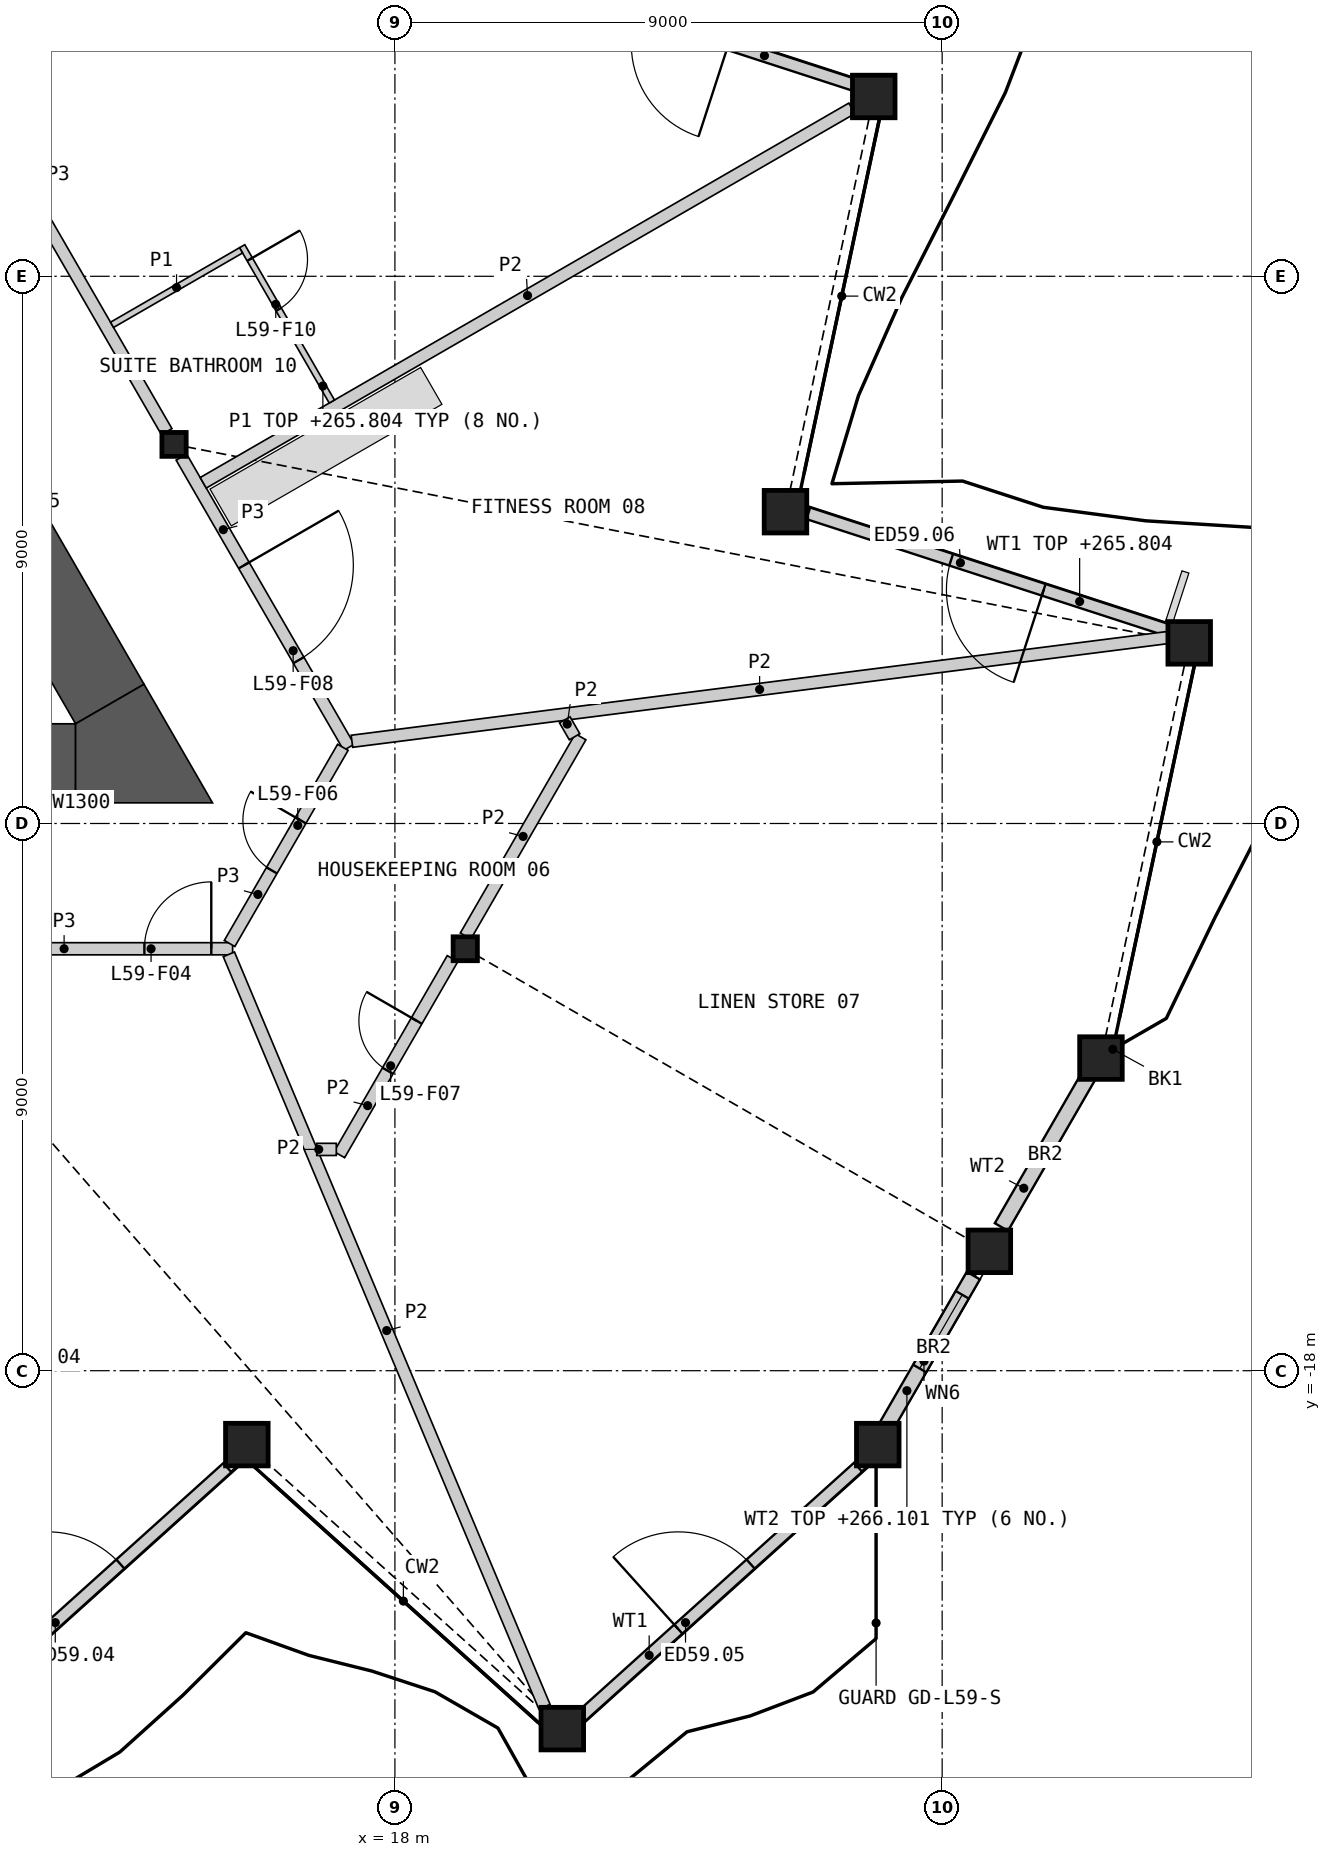
"""IFC4 building model, lengths in metres.
Left out: names, types, materials, properties, quantities, classifications, styles, units other than length and angle.
Written with IfcOpenShell. Run it as: python <this file> out.ifc"""

import sys

from ifc_helpers import new_model, si_unit, direction, frame, frame_2d, origin, origin_2d, place, context, subcontext, project, spatial, polyline, rectangle, hollow_rectangle, i_section, outline, extrude, element, fill, save


model = new_model("IFC4")
c1 = context("Model", 3, precision=1e-05, world=origin(), true_north=direction((0.0, 1.0)))
c2 = subcontext(c1, "Body", "Model", "MODEL_VIEW")
j1 = project(units=[si_unit("LENGTHUNIT", "METRE"), si_unit("PLANEANGLEUNIT", "RADIAN")], contexts=[c1])
p1 = place(None, origin())
s1 = spatial("IfcSite", under=j1, at=p1, CompositionType="ELEMENT")
p2 = place(p1, origin())
s2 = spatial("IfcBuilding", under=s1, at=p2, CompositionType="ELEMENT")
p3 = place(p2, frame((0.0, 0.0, 263.4)))
s3 = spatial("IfcBuildingStorey", under=s2, at=p3, CompositionType="ELEMENT", Elevation=263.4)
for number, where, z_axis, x_axis in (
    (1, (15.565, -19.215, 0.0), (0.0, 0.0, 1.0), (1.0, 0.0, 0.0)),
    (2, (20.753, -23.887, 0.0), (0.0, 0.0, 1.0), (1.0, 0.0, 0.0)),
    (3, (25.941, -19.215, 0.0), (0.0, 0.0, 1.0), (1.0, 0.0, 0.0)),
    (4, (27.776, -16.037, 0.0), (0.0, 0.0, 1.0), (1.0, 0.0, 0.0)),
    (5, (29.612, -12.858, 0.0), (0.0, 0.0, 1.0), (1.0, 0.0, 0.0)),
    (6, (31.063, -6.029, 0.0), (0.0, 0.0, 1.0), (1.0, 0.0, 0.0)),
    (7, (24.423, -3.872, 0.0), (0.0, 0.0, 1.0), (1.0, 0.0, 0.0)),
    (8, (25.875, 2.957, 0.0), (0.0, 0.0, 1.0), (1.0, 0.0, 0.0)),
):
    element("IfcColumn", number, at=place(p3, frame(where, z_axis=z_axis, x_axis=x_axis)), inside=s3, PredefinedType="COLUMN", context=c2, shape_type="SweptSolid", body=[
        extrude(hollow_rectangle(XDim=0.7, YDim=0.7, WallThickness=0.045, at=origin_2d()), origin(), (0.0, 0.0, 1.0), 3.6),
    ])
for number, where, z_axis, x_axis in (
    (9, (19.157, -11.06, 0.0), (0.0, 0.0, 1.0), (1.0, 0.0, 0.0)),
    (10, (14.368, -2.765, 0.0), (0.0, 0.0, 1.0), (1.0, 0.0, 0.0)),
):
    element("IfcColumn", number, at=place(p3, frame(where, z_axis=z_axis, x_axis=x_axis)), inside=s3, PredefinedType="COLUMN", context=c2, shape_type="SweptSolid", body=[
        extrude(i_section(OverallWidth=0.399, OverallDepth=0.393, WebThickness=0.023, FlangeThickness=0.037, at=origin_2d()), origin(), (0.0, 0.0, 1.0), 3.6),
    ])
p4 = place(p3, frame((10.671, -23.713, 0.0), z_axis=(0.0, 0.0, 1.0), x_axis=(0.74316789204, 0.669104987458, 0.0)))
e11 = element("IfcWall", 11, at=p4, inside=s3, PredefinedType="SOLIDWALL", context=c2, shape_type="SweptSolid", body=[
    extrude(rectangle(XDim=6.154, YDim=0.2, at=frame_2d((3.077, 0.0))), origin(), (0.0, 0.0, 1.0), 2.701),
])
p5 = place(p4, frame((2.186, 0.0, 0.0)))
e12 = element("IfcOpeningElement", 12, at=p5, cuts=e11, PredefinedType="OPENING", context=c2, shape_type="SweptSolid", body=[
    extrude(rectangle(XDim=1.6, YDim=2.4, at=frame_2d((0.8, 1.2))), frame((0.0, 0.11, 0.0), z_axis=(0.0, -1.0, 0.0), x_axis=(1.0, 0.0, 0.0)), (0.0, 0.0, 1.0), 0.22),
])
p6 = place(p3, frame((21.036, -23.713, 0.0), z_axis=(0.0, 0.0, 1.0), x_axis=(0.743142515738, 0.669133171575, 0.0)))
e13 = element("IfcWall", 13, at=p6, inside=s3, PredefinedType="SOLIDWALL", context=c2, shape_type="SweptSolid", body=[
    extrude(rectangle(XDim=6.166, YDim=0.2, at=frame_2d((3.083, 0.0))), origin(), (0.0, 0.0, 1.0), 2.701),
])
p7 = place(p6, frame((2.186, 0.0, 0.0)))
e14 = element("IfcOpeningElement", 14, at=p7, cuts=e13, PredefinedType="OPENING", context=c2, shape_type="SweptSolid", body=[
    extrude(rectangle(XDim=1.6, YDim=2.4, at=frame_2d((0.8, 1.2))), frame((0.0, 0.11, 0.0), z_axis=(0.0, -1.0, 0.0), x_axis=(1.0, 0.0, 0.0)), (0.0, 0.0, 1.0), 0.22),
])
p8 = place(p3, frame((26.056, -18.96, 0.0), z_axis=(0.0, 0.0, 1.0), x_axis=(0.499949632511, 0.866054481515, 0.0)))
e15 = element("IfcWall", 15, at=p8, inside=s3, PredefinedType="SOLIDWALL", context=c2, shape_type="SweptSolid", body=[
    extrude(rectangle(XDim=2.915, YDim=0.25, at=frame_2d((1.458, 0.0))), origin(), (0.0, 0.0, 1.0), 2.701),
])
p9 = place(p8, frame((1.15, 0.0, 1.9)))
e16 = element("IfcOpeningElement", 16, at=p9, cuts=e15, PredefinedType="OPENING", context=c2, shape_type="SweptSolid", body=[
    extrude(rectangle(XDim=1.4, YDim=0.6, at=frame_2d((0.7, 0.3))), frame((0.0, 0.135, 0.0), z_axis=(0.0, -1.0, 0.0), x_axis=(1.0, 0.0, 0.0)), (0.0, 0.0, 1.0), 0.27),
])
p10 = place(p3, frame((27.974, -15.637, 0.0), z_axis=(0.0, 0.0, 1.0), x_axis=(0.499971101808, 0.86604208752, 0.0)))
e17 = element("IfcWall", 17, at=p10, inside=s3, PredefinedType="SOLIDWALL", context=c2, shape_type="SweptSolid", body=[
    extrude(rectangle(XDim=2.947, YDim=0.25, at=frame_2d((1.473, 0.0))), origin(), (0.0, 0.0, 1.0), 2.701),
])
p11 = place(p3, frame((30.749, -5.832, 0.0), z_axis=(0.0, 0.0, 1.0), x_axis=(-0.95105557136, 0.309019902571, 0.0)))
e18 = element("IfcWall", 18, at=p11, inside=s3, PredefinedType="SOLIDWALL", context=c2, shape_type="SweptSolid", body=[
    extrude(rectangle(XDim=6.257, YDim=0.2, at=frame_2d((3.128, 0.0))), origin(), (0.0, 0.0, 1.0), 2.404),
])
p12 = place(p11, frame((2.186, 0.0, 0.0)))
e19 = element("IfcOpeningElement", 19, at=p12, cuts=e18, PredefinedType="OPENING", context=c2, shape_type="SweptSolid", body=[
    extrude(rectangle(XDim=1.6, YDim=2.4, at=frame_2d((0.8, 1.2))), frame((0.0, 0.11, 0.0), z_axis=(0.0, -1.0, 0.0), x_axis=(1.0, 0.0, 0.0)), (0.0, 0.0, 1.0), 0.22),
])
p13 = place(p3, frame((25.566, 3.145, 0.0), z_axis=(0.0, 0.0, 1.0), x_axis=(-0.951057270474, 0.309014673241, 0.0)))
e20 = element("IfcWall", 20, at=p13, inside=s3, PredefinedType="SOLIDWALL", context=c2, shape_type="SweptSolid", body=[
    extrude(rectangle(XDim=6.263, YDim=0.2, at=frame_2d((3.131, 0.0))), origin(), (0.0, 0.0, 1.0), 2.701),
])
p14 = place(p13, frame((2.186, 0.0, 0.0)))
e21 = element("IfcOpeningElement", 21, at=p14, cuts=e20, PredefinedType="OPENING", context=c2, shape_type="SweptSolid", body=[
    extrude(rectangle(XDim=1.6, YDim=2.4, at=frame_2d((0.8, 1.2))), frame((0.0, 0.11, 0.0), z_axis=(0.0, -1.0, 0.0), x_axis=(1.0, 0.0, 0.0)), (0.0, 0.0, 1.0), 0.22),
])
p15 = place(p3, frame((-12.748, -8.01, 0.0), z_axis=(0.0, 0.0, 1.0), x_axis=(1.0, 0.0, 0.0)))
e22 = element("IfcWall", 22, at=p15, inside=s3, PredefinedType="SHEAR", context=c2, shape_type="SweptSolid", body=[
    extrude(rectangle(XDim=25.497, YDim=1.3, at=frame_2d((12.748, 0.0))), origin(), (0.0, 0.0, 1.0), 3.25),
])
p16 = place(p3, frame((13.311, -7.035, 0.0), z_axis=(0.0, 0.0, 1.0), x_axis=(-0.500003555838, 0.866023350811, 0.0)))
e23 = element("IfcWall", 23, at=p16, inside=s3, PredefinedType="SHEAR", context=c2, shape_type="SweptSolid", body=[
    extrude(rectangle(XDim=4.26, YDim=1.3, at=frame_2d((2.13, 0.0))), origin(), (0.0, 0.0, 1.0), 3.25),
])
p17 = place(p3, origin())
e24 = element("IfcWall", 24, at=p17, inside=s3, PredefinedType="SHEAR", context=c2, shape_type="SweptSolid", body=[
    extrude(outline(polyline([(12.748, -8.66), (12.748, -7.36), (13.874, -6.71), (15.0, -8.66), (12.748, -8.66)])), origin(), (0.0, 0.0, 1.0), 3.25),
])
p18 = place(p3, frame((9.699, 5.321, 0.0), z_axis=(0.0, 0.0, 1.0), x_axis=(0.49998193945, -0.866035830797, 0.0)))
e25 = element("IfcWall", 25, at=p18, inside=s3, PredefinedType="PARTITIONING", context=c2, shape_type="SweptSolid", body=[
    extrude(rectangle(XDim=9.094, YDim=0.2, at=frame_2d((4.547, 0.0))), origin(), (0.0, 0.0, 1.0), 3.25),
])
p19 = place(p18, frame((1.162, 0.0, 0.0)))
e26 = element("IfcOpeningElement", 26, at=p19, cuts=e25, PredefinedType="OPENING", context=c2, shape_type="SweptSolid", body=[
    extrude(rectangle(XDim=1.1, YDim=2.1, at=frame_2d((0.55, 1.05))), frame((0.0, 0.11, 0.0), z_axis=(0.0, -1.0, 0.0), x_axis=(1.0, 0.0, 0.0)), (0.0, 0.0, 1.0), 0.22),
])
p20 = place(p3, frame((9.788, -11.06, 0.0), z_axis=(0.0, 0.0, 1.0), x_axis=(1.0, 0.0, 0.0)))
e27 = element("IfcWall", 27, at=p20, inside=s3, PredefinedType="PARTITIONING", context=c2, shape_type="SweptSolid", body=[
    extrude(rectangle(XDim=5.543, YDim=0.2, at=frame_2d((2.771, 0.0))), origin(), (0.0, 0.0, 1.0), 3.25),
])
p21 = place(p20, frame((4.092, 0.0, 0.0)))
e28 = element("IfcOpeningElement", 28, at=p21, cuts=e27, PredefinedType="OPENING", context=c2, shape_type="SweptSolid", body=[
    extrude(rectangle(XDim=1.1, YDim=2.1, at=frame_2d((0.55, 1.05))), frame((0.0, 0.11, 0.0), z_axis=(0.0, -1.0, 0.0), x_axis=(1.0, 0.0, 0.0)), (0.0, 0.0, 1.0), 0.22),
])
p22 = place(p3, frame((14.489, -2.975, 0.0), z_axis=(0.0, 0.0, 1.0), x_axis=(0.500017753321, -0.866015153657, 0.0)))
e29 = element("IfcWall", 29, at=p22, inside=s3, PredefinedType="PARTITIONING", context=c2, shape_type="SweptSolid", body=[
    extrude(rectangle(XDim=5.51, YDim=0.2, at=frame_2d((2.755, 0.0))), origin(), (0.0, 0.0, 1.0), 3.25),
])
p23 = place(p22, frame((2.056, 0.0, 0.0)))
e30 = element("IfcOpeningElement", 30, at=p23, cuts=e29, PredefinedType="OPENING", context=c2, shape_type="SweptSolid", body=[
    extrude(rectangle(XDim=1.8, YDim=2.1, at=frame_2d((0.9, 1.05))), frame((0.0, 0.11, 0.0), z_axis=(0.0, -1.0, 0.0), x_axis=(1.0, 0.0, 0.0)), (0.0, 0.0, 1.0), 0.22),
])
p24 = place(p3, frame((15.281, -10.974, 0.0), z_axis=(0.0, 0.0, 1.0), x_axis=(0.499958791762, 0.866049194065, 0.0)))
e31 = element("IfcWall", 31, at=p24, inside=s3, PredefinedType="PARTITIONING", context=c2, shape_type="SweptSolid", body=[
    extrude(rectangle(XDim=3.726, YDim=0.2, at=frame_2d((1.863, 0.0))), origin(), (0.0, 0.0, 1.0), 3.25),
])
p25 = place(p24, frame((1.388, 0.0, 0.0)))
e32 = element("IfcOpeningElement", 32, at=p25, cuts=e31, PredefinedType="OPENING", context=c2, shape_type="SweptSolid", body=[
    extrude(rectangle(XDim=0.95, YDim=2.1, at=frame_2d((0.475, 1.05))), frame((0.0, 0.11, 0.0), z_axis=(0.0, -1.0, 0.0), x_axis=(1.0, 0.0, 0.0)), (0.0, 0.0, 1.0), 0.22),
])
p26 = place(p3, frame((17.293, -7.648, 0.0), z_axis=(0.0, 0.0, 1.0), x_axis=(0.992013080374, 0.126135040205, 0.0)))
e33 = element("IfcWall", 33, at=p26, inside=s3, PredefinedType="PARTITIONING", context=c2, shape_type="SweptSolid", body=[
    extrude(rectangle(XDim=13.518, YDim=0.2, at=frame_2d((6.759, 0.0))), origin(), (0.0, 0.0, 1.0), 2.404),
])
p27 = place(p3, frame((15.27, -11.153, 0.0), z_axis=(0.0, 0.0, 1.0), x_axis=(0.386788567553, -0.922168424969, 0.0)))
e34 = element("IfcWall", 34, at=p27, inside=s3, PredefinedType="PARTITIONING", context=c2, shape_type="SweptSolid", body=[
    extrude(rectangle(XDim=13.419, YDim=0.2, at=frame_2d((6.709, 0.0))), origin(), (0.0, 0.0, 1.0), 2.404),
])
p28 = place(p3, frame((14.848, -3.396, 0.0), z_axis=(0.0, 0.0, 1.0), x_axis=(0.866026822589, 0.49999754255, 0.0)))
e35 = element("IfcWall", 35, at=p28, inside=s3, PredefinedType="PARTITIONING", context=c2, shape_type="SweptSolid", body=[
    extrude(rectangle(XDim=12.317, YDim=0.2, at=frame_2d((6.159, 0.0))), origin(), (0.0, 0.0, 1.0), 2.404),
])
p29 = place(p3, frame((19.162, -10.851, 0.0), z_axis=(0.0, 0.0, 1.0), x_axis=(0.500011000363, 0.866019052629, 0.0)))
e36 = element("IfcWall", 36, at=p29, inside=s3, PredefinedType="PARTITIONING", context=c2, shape_type="SweptSolid", body=[
    extrude(rectangle(XDim=3.784, YDim=0.2, at=frame_2d((1.892, 0.0))), origin(), (0.0, 0.0, 1.0), 2.404),
])
p30 = place(p3, frame((17.086, -14.447, 0.0), z_axis=(0.0, 0.0, 1.0), x_axis=(0.500004411858, 0.866022856582, 0.0)))
e37 = element("IfcWall", 37, at=p30, inside=s3, PredefinedType="PARTITIONING", context=c2, shape_type="SweptSolid", body=[
    extrude(rectangle(XDim=3.723, YDim=0.2, at=frame_2d((1.861, 0.0))), origin(), (0.0, 0.0, 1.0), 2.404),
])
p31 = place(p30, frame((1.593, 0.0, 0.0)))
e38 = element("IfcOpeningElement", 38, at=p31, cuts=e37, PredefinedType="OPENING", context=c2, shape_type="SweptSolid", body=[
    extrude(rectangle(XDim=0.95, YDim=2.1, at=frame_2d((0.475, 1.05))), frame((0.0, 0.11, 0.0), z_axis=(0.0, -1.0, 0.0), x_axis=(1.0, 0.0, 0.0)), (0.0, 0.0, 1.0), 0.22),
])
p32 = place(p3, frame((20.794, -7.295, 0.0), z_axis=(0.0, 0.0, 1.0), x_axis=(0.499897828833, -0.8660843843, 0.0)))
e39 = element("IfcWall", 39, at=p32, inside=s3, PredefinedType="PARTITIONING", context=c2, shape_type="SweptSolid", body=[
    extrude(rectangle(XDim=0.321, YDim=0.2, at=frame_2d((0.161, 0.0))), origin(), (0.0, 0.0, 1.0), 2.404),
])
p33 = place(p3, frame((16.715, -14.36, 0.0), z_axis=(0.0, 0.0, 1.0), x_axis=(1.0, 0.0, 0.0)))
e40 = element("IfcWall", 40, at=p33, inside=s3, PredefinedType="PARTITIONING", context=c2, shape_type="SweptSolid", body=[
    extrude(rectangle(XDim=0.321, YDim=0.2, at=frame_2d((0.161, 0.0))), origin(), (0.0, 0.0, 1.0), 2.404),
])
p34 = place(p3, frame((15.488, 0.495, 0.0), z_axis=(0.0, 0.0, 1.0), x_axis=(0.500037662692, -0.866003658127, 0.0)))
e41 = element("IfcWall", 41, at=p34, inside=s3, PredefinedType="PARTITIONING", context=c2, shape_type="SweptSolid", body=[
    extrude(rectangle(XDim=2.95, YDim=0.1, at=frame_2d((1.475, 0.0))), origin(), (0.0, 0.0, 1.0), 2.404),
])
p35 = place(p34, frame((0.25, 0.0, 0.0)))
e42 = element("IfcOpeningElement", 42, at=p35, cuts=e41, PredefinedType="OPENING", context=c2, shape_type="SweptSolid", body=[
    extrude(rectangle(XDim=0.95, YDim=2.1, at=frame_2d((0.475, 1.05))), frame((0.0, 0.06, 0.0), z_axis=(0.0, -1.0, 0.0), x_axis=(1.0, 0.0, 0.0)), (0.0, 0.0, 1.0), 0.12),
])
p36 = place(p3, frame((13.348, -0.799, 0.0), z_axis=(0.0, 0.0, 1.0), x_axis=(0.866014668023, 0.500018594424, 0.0)))
e43 = element("IfcWall", 43, at=p36, inside=s3, PredefinedType="PARTITIONING", context=c2, shape_type="SweptSolid", body=[
    extrude(rectangle(XDim=2.45, YDim=0.1, at=frame_2d((1.225, 0.0))), origin(), (0.0, 0.0, 1.0), 2.404),
])
p37 = place(p5, origin())
e44 = element("IfcDoor", 44, at=p37, inside=s3, OperationType="DOUBLE_DOOR_SINGLE_SWING", PredefinedType="DOOR", context=c2, shape_type="SweptSolid", body=[
    extrude(rectangle(XDim=1.6, YDim=2.4, at=frame_2d((0.8, 1.2))), frame((0.0, 0.025, 0.0), z_axis=(0.0, -1.0, 0.0), x_axis=(1.0, 0.0, 0.0)), (0.0, 0.0, 1.0), 0.05),
])
fill(e12, e44)
p38 = place(p7, origin())
e45 = element("IfcDoor", 45, at=p38, inside=s3, OperationType="DOUBLE_DOOR_SINGLE_SWING", PredefinedType="DOOR", context=c2, shape_type="SweptSolid", body=[
    extrude(rectangle(XDim=1.6, YDim=2.4, at=frame_2d((0.8, 1.2))), frame((0.0, 0.025, 0.0), z_axis=(0.0, -1.0, 0.0), x_axis=(1.0, 0.0, 0.0)), (0.0, 0.0, 1.0), 0.05),
])
fill(e14, e45)
p39 = place(p9, origin())
e46 = element("IfcWindow", 46, at=p39, inside=s3, PartitioningType="SINGLE_PANEL", PredefinedType="WINDOW", context=c2, shape_type="SweptSolid", body=[
    extrude(rectangle(XDim=1.4, YDim=0.6, at=frame_2d((0.7, 0.3))), frame((0.0, 0.03, 0.0), z_axis=(0.0, -1.0, 0.0), x_axis=(1.0, 0.0, 0.0)), (0.0, 0.0, 1.0), 0.06),
])
fill(e16, e46)
p40 = place(p12, origin())
e47 = element("IfcDoor", 47, at=p40, inside=s3, OperationType="DOUBLE_DOOR_SINGLE_SWING", PredefinedType="DOOR", context=c2, shape_type="SweptSolid", body=[
    extrude(rectangle(XDim=1.6, YDim=2.4, at=frame_2d((0.8, 1.2))), frame((0.0, 0.025, 0.0), z_axis=(0.0, -1.0, 0.0), x_axis=(1.0, 0.0, 0.0)), (0.0, 0.0, 1.0), 0.05),
])
fill(e19, e47)
p41 = place(p21, origin())
e48 = element("IfcDoor", 48, at=p41, inside=s3, OperationType="SINGLE_SWING_RIGHT", PredefinedType="DOOR", context=c2, shape_type="SweptSolid", body=[
    extrude(rectangle(XDim=1.1, YDim=2.1, at=frame_2d((0.55, 1.05))), frame((0.0, 0.025, 0.0), z_axis=(0.0, -1.0, 0.0), x_axis=(1.0, 0.0, 0.0)), (0.0, 0.0, 1.0), 0.05),
])
fill(e28, e48)
p42 = place(p25, origin())
e49 = element("IfcDoor", 49, at=p42, inside=s3, OperationType="SINGLE_SWING_RIGHT", PredefinedType="DOOR", context=c2, shape_type="SweptSolid", body=[
    extrude(rectangle(XDim=0.95, YDim=2.1, at=frame_2d((0.475, 1.05))), frame((0.0, 0.025, 0.0), z_axis=(0.0, -1.0, 0.0), x_axis=(1.0, 0.0, 0.0)), (0.0, 0.0, 1.0), 0.05),
])
fill(e32, e49)
p43 = place(p31, origin())
e50 = element("IfcDoor", 50, at=p43, inside=s3, OperationType="SINGLE_SWING_RIGHT", PredefinedType="DOOR", context=c2, shape_type="SweptSolid", body=[
    extrude(rectangle(XDim=0.95, YDim=2.1, at=frame_2d((0.475, 1.05))), frame((0.0, 0.025, 0.0), z_axis=(0.0, -1.0, 0.0), x_axis=(1.0, 0.0, 0.0)), (0.0, 0.0, 1.0), 0.05),
])
fill(e38, e50)
p44 = place(p23, origin())
e51 = element("IfcDoor", 51, at=p44, inside=s3, OperationType="DOUBLE_DOOR_SINGLE_SWING", PredefinedType="DOOR", context=c2, shape_type="SweptSolid", body=[
    extrude(rectangle(XDim=1.8, YDim=2.1, at=frame_2d((0.9, 1.05))), frame((0.0, 0.025, 0.0), z_axis=(0.0, -1.0, 0.0), x_axis=(1.0, 0.0, 0.0)), (0.0, 0.0, 1.0), 0.05),
])
fill(e30, e51)
p45 = place(p35, origin())
e52 = element("IfcDoor", 52, at=p45, inside=s3, OperationType="SINGLE_SWING_LEFT", PredefinedType="DOOR", context=c2, shape_type="SweptSolid", body=[
    extrude(rectangle(XDim=0.95, YDim=2.1, at=frame_2d((0.475, 1.05))), frame((0.0, 0.025, 0.0), z_axis=(0.0, -1.0, 0.0), x_axis=(1.0, 0.0, 0.0)), (0.0, 0.0, 1.0), 0.05),
])
fill(e42, e52)
save(model, sys.argv[1])
